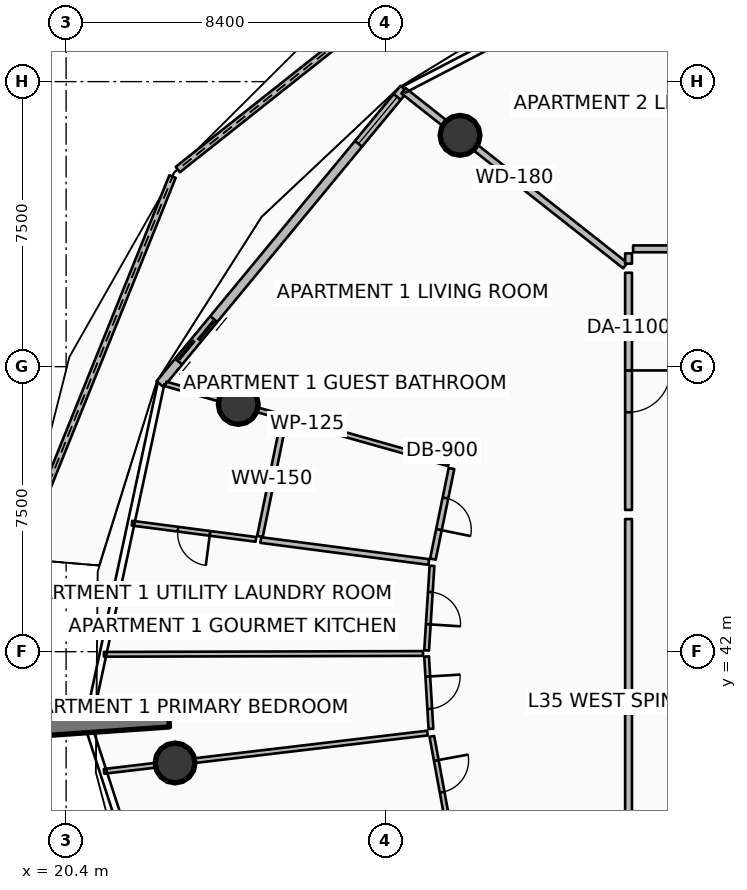
"""IFC4 building model, lengths in metres.
Left out: names, types, materials, properties, quantities, classifications, styles, units other than length and angle.
Written with IfcOpenShell. Run it as: python <this file> out.ifc"""

import sys

from ifc_helpers import new_model, si_unit, direction, frame, frame_2d, origin, origin_2d, place, context, subcontext, project, spatial, polyline, rectangle, circle, outline, extrude, element, fill, save


model = new_model("IFC4")
c1 = context("Model", 3, precision=1e-05, world=origin(), true_north=direction((0.0, 1.0)))
c2 = subcontext(c1, "Body", "Model", "MODEL_VIEW")
j1 = project(units=[si_unit("LENGTHUNIT", "METRE"), si_unit("PLANEANGLEUNIT", "RADIAN")], contexts=[c1])
p1 = place(None, origin())
s1 = spatial("IfcSite", under=j1, at=p1, CompositionType="ELEMENT")
p2 = place(p1, origin())
s2 = spatial("IfcBuilding", under=s1, at=p2, CompositionType="ELEMENT")
p3 = place(p2, frame((0.0, 0.0, 142.8)))
s3 = spatial("IfcBuildingStorey", under=s2, at=p3, CompositionType="ELEMENT", Elevation=142.8)
p4 = place(p3, frame((23.103, 40.259, 0.0), z_axis=(0.0, 0.0, 1.0), x_axis=(-0.997564163539, -0.069754853754, 0.0)))
e1 = element("IfcWall", 1, at=p4, inside=s3, PredefinedType="SOLIDWALL", context=c2, shape_type="SweptSolid", body=[
    extrude(rectangle(XDim=3.5, YDim=0.48, at=frame_2d((1.75, 0.0))), origin(), (0.0, 0.0, 1.0), 3.75),
])
for number, where, z_axis, x_axis in (
    (2, (30.766, 55.586, 0.0), (0.0, 0.0, 1.0), (1.0, 0.0, 0.0)),
    (3, (24.93, 48.506, 0.0), (0.0, 0.0, 1.0), (1.0, 0.0, 0.0)),
    (4, (23.267, 39.073, 0.0), (0.0, 0.0, 1.0), (1.0, 0.0, 0.0)),
):
    element("IfcColumn", number, at=place(p3, frame(where, z_axis=z_axis, x_axis=x_axis)), inside=s3, PredefinedType="COLUMN", context=c2, shape_type="SweptSolid", body=[
        extrude(circle(Radius=0.525, at=origin_2d()), origin(), (0.0, 0.0, 1.0), 3.5),
    ])
p5 = place(p3, frame((31.461, 61.126, 0.0), z_axis=(0.0, 0.0, 1.0), x_axis=(-0.783643972098, -0.621210209989, 0.0)))
e5 = element("IfcWall", 5, at=p5, inside=s3, PredefinedType="PARAPET", context=c2, shape_type="SweptSolid", body=[
    extrude(outline(polyline([(0.0, 0.0), (10.365, 0.0), (10.365, 1.832), (5.182, 1.853), (0.0, 1.756), (0.0, 0.0)])), frame((0.0, 0.09, 0.0), z_axis=(0.0, -1.0, 0.0), x_axis=(1.0, 0.0, 0.0)), (0.0, 0.0, 1.0), 0.18),
])
p6 = place(p3, frame((23.2, 54.502, 0.0), z_axis=(0.0, 0.0, 1.0), x_axis=(-0.373952087888, -0.927448023322, 0.0)))
e6 = element("IfcWall", 6, at=p6, inside=s3, PredefinedType="PARAPET", context=c2, shape_type="SweptSolid", body=[
    extrude(outline(polyline([(0.0, 0.0), (10.84, 0.0), (10.84, 1.497), (5.42, 1.696), (0.0, 1.832), (0.0, 0.0)])), frame((0.0, 0.09, 0.0), z_axis=(0.0, -1.0, 0.0), x_axis=(1.0, 0.0, 0.0)), (0.0, 0.0, 1.0), 0.18),
])
p7 = place(p3, frame((29.291, 56.813, 0.0), z_axis=(0.0, 0.0, 1.0), x_axis=(-0.636771922292, -0.77105221547, 0.0)))
e7 = element("IfcWall", 7, at=p7, inside=s3, PredefinedType="SOLIDWALL", context=c2, shape_type="SweptSolid", body=[
    extrude(rectangle(XDim=10.082, YDim=0.24, at=frame_2d((5.041, 0.0))), origin(), (0.0, 0.0, 1.0), 2.45),
])
p8 = place(p7, frame((7.862, 0.0, 0.0)))
e8 = element("IfcOpeningElement", 8, at=p8, cuts=e7, PredefinedType="OPENING", context=c2, shape_type="SweptSolid", body=[
    extrude(rectangle(XDim=1.45, YDim=2.15, at=frame_2d((0.725, 1.075))), frame((0.0, 0.13, 0.0), z_axis=(0.0, -1.0, 0.0), x_axis=(1.0, 0.0, 0.0)), (0.0, 0.0, 1.0), 0.26),
])
p9 = place(p7, frame((0.28, 0.0, 0.65)))
e9 = element("IfcOpeningElement", 9, at=p9, cuts=e7, PredefinedType="OPENING", context=c2, shape_type="SweptSolid", body=[
    extrude(rectangle(XDim=1.6, YDim=1.5, at=frame_2d((0.8, 0.75))), frame((0.0, 0.13, 0.0), z_axis=(0.0, -1.0, 0.0), x_axis=(1.0, 0.0, 0.0)), (0.0, 0.0, 1.0), 0.26),
])
p10 = place(p3, frame((35.114, 52.159, 0.0), z_axis=(0.0, 0.0, 1.0), x_axis=(-0.78531739611, 0.619093359169, 0.0)))
e10 = element("IfcWall", 10, at=p10, inside=s3, PredefinedType="PARTITIONING", context=c2, shape_type="SweptSolid", body=[
    extrude(rectangle(XDim=7.43, YDim=0.18, at=frame_2d((3.715, 0.0))), origin(), (0.0, 0.0, 1.0), 2.94),
])
p11 = place(p3, frame((35.2, 51.971, 0.0), z_axis=(0.0, 0.0, 1.0), x_axis=(0.0, -1.0, 0.0)))
e11 = element("IfcWall", 11, at=p11, inside=s3, PredefinedType="PARTITIONING", context=c2, shape_type="SweptSolid", body=[
    extrude(rectangle(XDim=6.241, YDim=0.18, at=frame_2d((3.12, 0.0))), origin(), (0.0, 0.0, 1.0), 2.94),
])
p12 = place(p11, frame((2.57, 0.0, 0.0)))
e12 = element("IfcOpeningElement", 12, at=p12, cuts=e11, PredefinedType="OPENING", context=c2, shape_type="SweptSolid", body=[
    extrude(rectangle(XDim=1.1, YDim=2.1, at=frame_2d((0.55, 1.05))), frame((0.0, 0.1, 0.0), z_axis=(0.0, -1.0, 0.0), x_axis=(1.0, 0.0, 0.0)), (0.0, 0.0, 1.0), 0.2),
])
p13 = place(p3, frame((35.2, 45.49, 0.0), z_axis=(0.0, 0.0, 1.0), x_axis=(0.0, -1.0, 0.0)))
e13 = element("IfcWall", 13, at=p13, inside=s3, PredefinedType="PARTITIONING", context=c2, shape_type="SweptSolid", body=[
    extrude(rectangle(XDim=4.885, YDim=0.18, at=frame_2d((2.442, 0.0))), origin(), (0.0, 0.0, 1.0), 2.94),
])
p14 = place(p3, frame((30.465, 46.945, 0.0), z_axis=(0.0, 0.0, 1.0), x_axis=(-0.962456021196, 0.271437667363, 0.0)))
e14 = element("IfcWall", 14, at=p14, inside=s3, PredefinedType="PARTITIONING", context=c2, shape_type="SweptSolid", body=[
    extrude(rectangle(XDim=7.732, YDim=0.125, at=frame_2d((3.866, 0.0))), origin(), (0.0, 0.0, 1.0), 2.94),
])
p15 = place(p3, frame((30.541, 46.82, 0.0), z_axis=(0.0, 0.0, 1.0), x_axis=(-0.201072520907, -0.979576358094, 0.0)))
e15 = element("IfcWall", 15, at=p15, inside=s3, PredefinedType="PARTITIONING", context=c2, shape_type="SweptSolid", body=[
    extrude(rectangle(XDim=2.433, YDim=0.15, at=frame_2d((1.217, 0.0))), origin(), (0.0, 0.0, 1.0), 2.94),
])
p16 = place(p15, frame((0.792, 0.0, 0.0)))
e16 = element("IfcOpeningElement", 16, at=p16, cuts=e15, PredefinedType="OPENING", context=c2, shape_type="SweptSolid", body=[
    extrude(rectangle(XDim=0.85, YDim=2.06, at=frame_2d((0.425, 1.03))), frame((0.0, 0.085, 0.0), z_axis=(0.0, -1.0, 0.0), x_axis=(1.0, 0.0, 0.0)), (0.0, 0.0, 1.0), 0.17),
])
p17 = place(p3, frame((26.124, 48.066, 0.0), z_axis=(0.0, 0.0, 1.0), x_axis=(-0.201054681034, -0.979580019822, 0.0)))
e17 = element("IfcWall", 17, at=p17, inside=s3, PredefinedType="PARTITIONING", context=c2, shape_type="SweptSolid", body=[
    extrude(rectangle(XDim=3.098, YDim=0.15, at=frame_2d((1.549, 0.0))), origin(), (0.0, 0.0, 1.0), 2.94),
])
p18 = place(p3, frame((29.945, 44.36, 0.0), z_axis=(0.0, 0.0, 1.0), x_axis=(-0.991563130501, 0.129624682181, 0.0)))
e18 = element("IfcWall", 18, at=p18, inside=s3, PredefinedType="PARTITIONING", context=c2, shape_type="SweptSolid", body=[
    extrude(rectangle(XDim=4.46, YDim=0.15, at=frame_2d((2.23, 0.0))), origin(), (0.0, 0.0, 1.0), 2.94),
])
p19 = place(p3, frame((25.393, 44.955, 0.0), z_axis=(0.0, 0.0, 1.0), x_axis=(-0.991560176963, 0.12964727325, 0.0)))
e19 = element("IfcWall", 19, at=p19, inside=s3, PredefinedType="PARTITIONING", context=c2, shape_type="SweptSolid", body=[
    extrude(rectangle(XDim=3.286, YDim=0.125, at=frame_2d((1.643, 0.0))), origin(), (0.0, 0.0, 1.0), 2.94),
])
p20 = place(p19, frame((1.218, 0.0, 0.0)))
e20 = element("IfcOpeningElement", 20, at=p20, cuts=e19, PredefinedType="OPENING", context=c2, shape_type="SweptSolid", body=[
    extrude(rectangle(XDim=0.85, YDim=2.06, at=frame_2d((0.425, 1.03))), frame((0.0, 0.073, 0.0), z_axis=(0.0, -1.0, 0.0), x_axis=(1.0, 0.0, 0.0)), (0.0, 0.0, 1.0), 0.145),
])
p21 = place(p3, frame((29.791, 41.953, 0.0), z_axis=(0.0, 0.0, 1.0), x_axis=(-0.999996651439, -0.0025878777, 0.0)))
e21 = element("IfcWall", 21, at=p21, inside=s3, PredefinedType="PARTITIONING", context=c2, shape_type="SweptSolid", body=[
    extrude(rectangle(XDim=8.396, YDim=0.125, at=frame_2d((4.198, 0.0))), origin(), (0.0, 0.0, 1.0), 2.94),
])
p22 = place(p3, frame((30.028, 44.259, 0.0), z_axis=(0.0, 0.0, 1.0), x_axis=(-0.063707112834, -0.997968638673, 0.0)))
e22 = element("IfcWall", 22, at=p22, inside=s3, PredefinedType="PARTITIONING", context=c2, shape_type="SweptSolid", body=[
    extrude(rectangle(XDim=2.23, YDim=0.125, at=frame_2d((1.115, 0.0))), origin(), (0.0, 0.0, 1.0), 2.94),
])
p23 = place(p22, frame((0.69, 0.0, 0.0)))
e23 = element("IfcOpeningElement", 23, at=p23, cuts=e22, PredefinedType="OPENING", context=c2, shape_type="SweptSolid", body=[
    extrude(rectangle(XDim=0.85, YDim=2.06, at=frame_2d((0.425, 1.03))), frame((0.0, 0.073, 0.0), z_axis=(0.0, -1.0, 0.0), x_axis=(1.0, 0.0, 0.0)), (0.0, 0.0, 1.0), 0.145),
])
p24 = place(p3, frame((29.886, 41.873, 0.0), z_axis=(0.0, 0.0, 1.0), x_axis=(0.060058165276, -0.998194879161, 0.0)))
e24 = element("IfcWall", 24, at=p24, inside=s3, PredefinedType="PARTITIONING", context=c2, shape_type="SweptSolid", body=[
    extrude(rectangle(XDim=1.906, YDim=0.125, at=frame_2d((0.953, 0.0))), origin(), (0.0, 0.0, 1.0), 2.94),
])
p25 = place(p24, frame((0.528, 0.0, 0.0)))
e25 = element("IfcOpeningElement", 25, at=p25, cuts=e24, PredefinedType="OPENING", context=c2, shape_type="SweptSolid", body=[
    extrude(rectangle(XDim=0.85, YDim=2.06, at=frame_2d((0.425, 1.03))), frame((0.0, 0.073, 0.0), z_axis=(0.0, -1.0, 0.0), x_axis=(1.0, 0.0, 0.0)), (0.0, 0.0, 1.0), 0.145),
])
p26 = place(p3, frame((35.2, 40.365, 0.0), z_axis=(0.0, 0.0, 1.0), x_axis=(0.0, -1.0, 0.0)))
e26 = element("IfcWall", 26, at=p26, inside=s3, PredefinedType="PARTITIONING", context=c2, shape_type="SweptSolid", body=[
    extrude(rectangle(XDim=5.413, YDim=0.18, at=frame_2d((2.707, 0.0))), origin(), (0.0, 0.0, 1.0), 2.94),
])
p27 = place(p3, frame((29.907, 39.858, 0.0), z_axis=(0.0, 0.0, 1.0), x_axis=(-0.993070228419, -0.117522429465, 0.0)))
e27 = element("IfcWall", 27, at=p27, inside=s3, PredefinedType="PARTITIONING", context=c2, shape_type="SweptSolid", body=[
    extrude(rectangle(XDim=8.567, YDim=0.125, at=frame_2d((4.284, 0.0))), origin(), (0.0, 0.0, 1.0), 2.94),
])
p28 = place(p3, frame((30.025, 39.772, 0.0), z_axis=(0.0, 0.0, 1.0), x_axis=(0.180764237825, -0.983526456341, 0.0)))
e28 = element("IfcWall", 28, at=p28, inside=s3, PredefinedType="PARTITIONING", context=c2, shape_type="SweptSolid", body=[
    extrude(rectangle(XDim=2.138, YDim=0.125, at=frame_2d((1.069, 0.0))), origin(), (0.0, 0.0, 1.0), 2.94),
])
p29 = place(p28, frame((0.644, 0.0, 0.0)))
e29 = element("IfcOpeningElement", 29, at=p29, cuts=e28, PredefinedType="OPENING", context=c2, shape_type="SweptSolid", body=[
    extrude(rectangle(XDim=0.85, YDim=2.06, at=frame_2d((0.425, 1.03))), frame((0.0, 0.073, 0.0), z_axis=(0.0, -1.0, 0.0), x_axis=(1.0, 0.0, 0.0)), (0.0, 0.0, 1.0), 0.145),
])
p30 = place(p3, frame((41.944, 52.6, 0.0), z_axis=(0.0, 0.0, 1.0), x_axis=(-1.0, 0.0, 0.0)))
e30 = element("IfcWall", 30, at=p30, inside=s3, PredefinedType="PARTITIONING", context=c2, shape_type="SweptSolid", body=[
    extrude(rectangle(XDim=6.624, YDim=0.18, at=frame_2d((3.312, 0.0))), origin(), (0.0, 0.0, 1.0), 2.94),
])
p31 = place(p30, frame((2.762, 0.0, 0.0)))
e31 = element("IfcOpeningElement", 31, at=p31, cuts=e30, PredefinedType="OPENING", context=c2, shape_type="SweptSolid", body=[
    extrude(rectangle(XDim=1.1, YDim=2.1, at=frame_2d((0.55, 1.05))), frame((0.0, 0.1, 0.0), z_axis=(0.0, -1.0, 0.0), x_axis=(1.0, 0.0, 0.0)), (0.0, 0.0, 1.0), 0.2),
])
p32 = place(p3, frame((35.2, 52.48, 0.0), z_axis=(0.0, 0.0, 1.0), x_axis=(0.0, -1.0, 0.0)))
e32 = element("IfcWall", 32, at=p32, inside=s3, PredefinedType="PARTITIONING", context=c2, shape_type="SweptSolid", body=[
    extrude(rectangle(XDim=0.269, YDim=0.18, at=frame_2d((0.135, 0.0))), origin(), (0.0, 0.0, 1.0), 2.94),
])
p33 = place(p8, origin())
e33 = element("IfcDoor", 33, at=p33, inside=s3, OperationType="DOUBLE_DOOR_SLIDING", PredefinedType="DOOR", context=c2, shape_type="SweptSolid", body=[
    extrude(rectangle(XDim=1.45, YDim=2.15, at=frame_2d((0.725, 1.075))), frame((0.0, 0.025, 0.0), z_axis=(0.0, -1.0, 0.0), x_axis=(1.0, 0.0, 0.0)), (0.0, 0.0, 1.0), 0.05),
])
fill(e8, e33)
p34 = place(p9, origin())
e34 = element("IfcWindow", 34, at=p34, inside=s3, PartitioningType="SINGLE_PANEL", PredefinedType="WINDOW", context=c2, shape_type="SweptSolid", body=[
    extrude(rectangle(XDim=1.6, YDim=1.5, at=frame_2d((0.8, 0.75))), frame((0.0, 0.03, 0.0), z_axis=(0.0, -1.0, 0.0), x_axis=(1.0, 0.0, 0.0)), (0.0, 0.0, 1.0), 0.06),
])
fill(e9, e34)
p35 = place(p12, origin())
e35 = element("IfcDoor", 35, at=p35, inside=s3, OperationType="SINGLE_SWING_LEFT", PredefinedType="DOOR", context=c2, shape_type="SweptSolid", body=[
    extrude(rectangle(XDim=1.1, YDim=2.1, at=frame_2d((0.55, 1.05))), frame((0.0, 0.025, 0.0), z_axis=(0.0, -1.0, 0.0), x_axis=(1.0, 0.0, 0.0)), (0.0, 0.0, 1.0), 0.05),
])
fill(e12, e35)
p36 = place(p16, origin())
e36 = element("IfcDoor", 36, at=p36, inside=s3, OperationType="SINGLE_SWING_RIGHT", PredefinedType="DOOR", context=c2, shape_type="SweptSolid", body=[
    extrude(rectangle(XDim=0.85, YDim=2.06, at=frame_2d((0.425, 1.03))), frame((0.0, 0.025, 0.0), z_axis=(0.0, -1.0, 0.0), x_axis=(1.0, 0.0, 0.0)), (0.0, 0.0, 1.0), 0.05),
])
fill(e16, e36)
p37 = place(p20, origin())
e37 = element("IfcDoor", 37, at=p37, inside=s3, OperationType="SINGLE_SWING_LEFT", PredefinedType="DOOR", context=c2, shape_type="SweptSolid", body=[
    extrude(rectangle(XDim=0.85, YDim=2.06, at=frame_2d((0.425, 1.03))), frame((0.0, 0.025, 0.0), z_axis=(0.0, -1.0, 0.0), x_axis=(1.0, 0.0, 0.0)), (0.0, 0.0, 1.0), 0.05),
])
fill(e20, e37)
p38 = place(p23, origin())
e38 = element("IfcDoor", 38, at=p38, inside=s3, OperationType="SINGLE_SWING_RIGHT", PredefinedType="DOOR", context=c2, shape_type="SweptSolid", body=[
    extrude(rectangle(XDim=0.85, YDim=2.06, at=frame_2d((0.425, 1.03))), frame((0.0, 0.025, 0.0), z_axis=(0.0, -1.0, 0.0), x_axis=(1.0, 0.0, 0.0)), (0.0, 0.0, 1.0), 0.05),
])
fill(e23, e38)
p39 = place(p25, origin())
e39 = element("IfcDoor", 39, at=p39, inside=s3, OperationType="SINGLE_SWING_LEFT", PredefinedType="DOOR", context=c2, shape_type="SweptSolid", body=[
    extrude(rectangle(XDim=0.85, YDim=2.06, at=frame_2d((0.425, 1.03))), frame((0.0, 0.025, 0.0), z_axis=(0.0, -1.0, 0.0), x_axis=(1.0, 0.0, 0.0)), (0.0, 0.0, 1.0), 0.05),
])
fill(e25, e39)
p40 = place(p29, origin())
e40 = element("IfcDoor", 40, at=p40, inside=s3, OperationType="SINGLE_SWING_LEFT", PredefinedType="DOOR", context=c2, shape_type="SweptSolid", body=[
    extrude(rectangle(XDim=0.85, YDim=2.06, at=frame_2d((0.425, 1.03))), frame((0.0, 0.025, 0.0), z_axis=(0.0, -1.0, 0.0), x_axis=(1.0, 0.0, 0.0)), (0.0, 0.0, 1.0), 0.05),
])
fill(e29, e40)
save(model, sys.argv[1])
